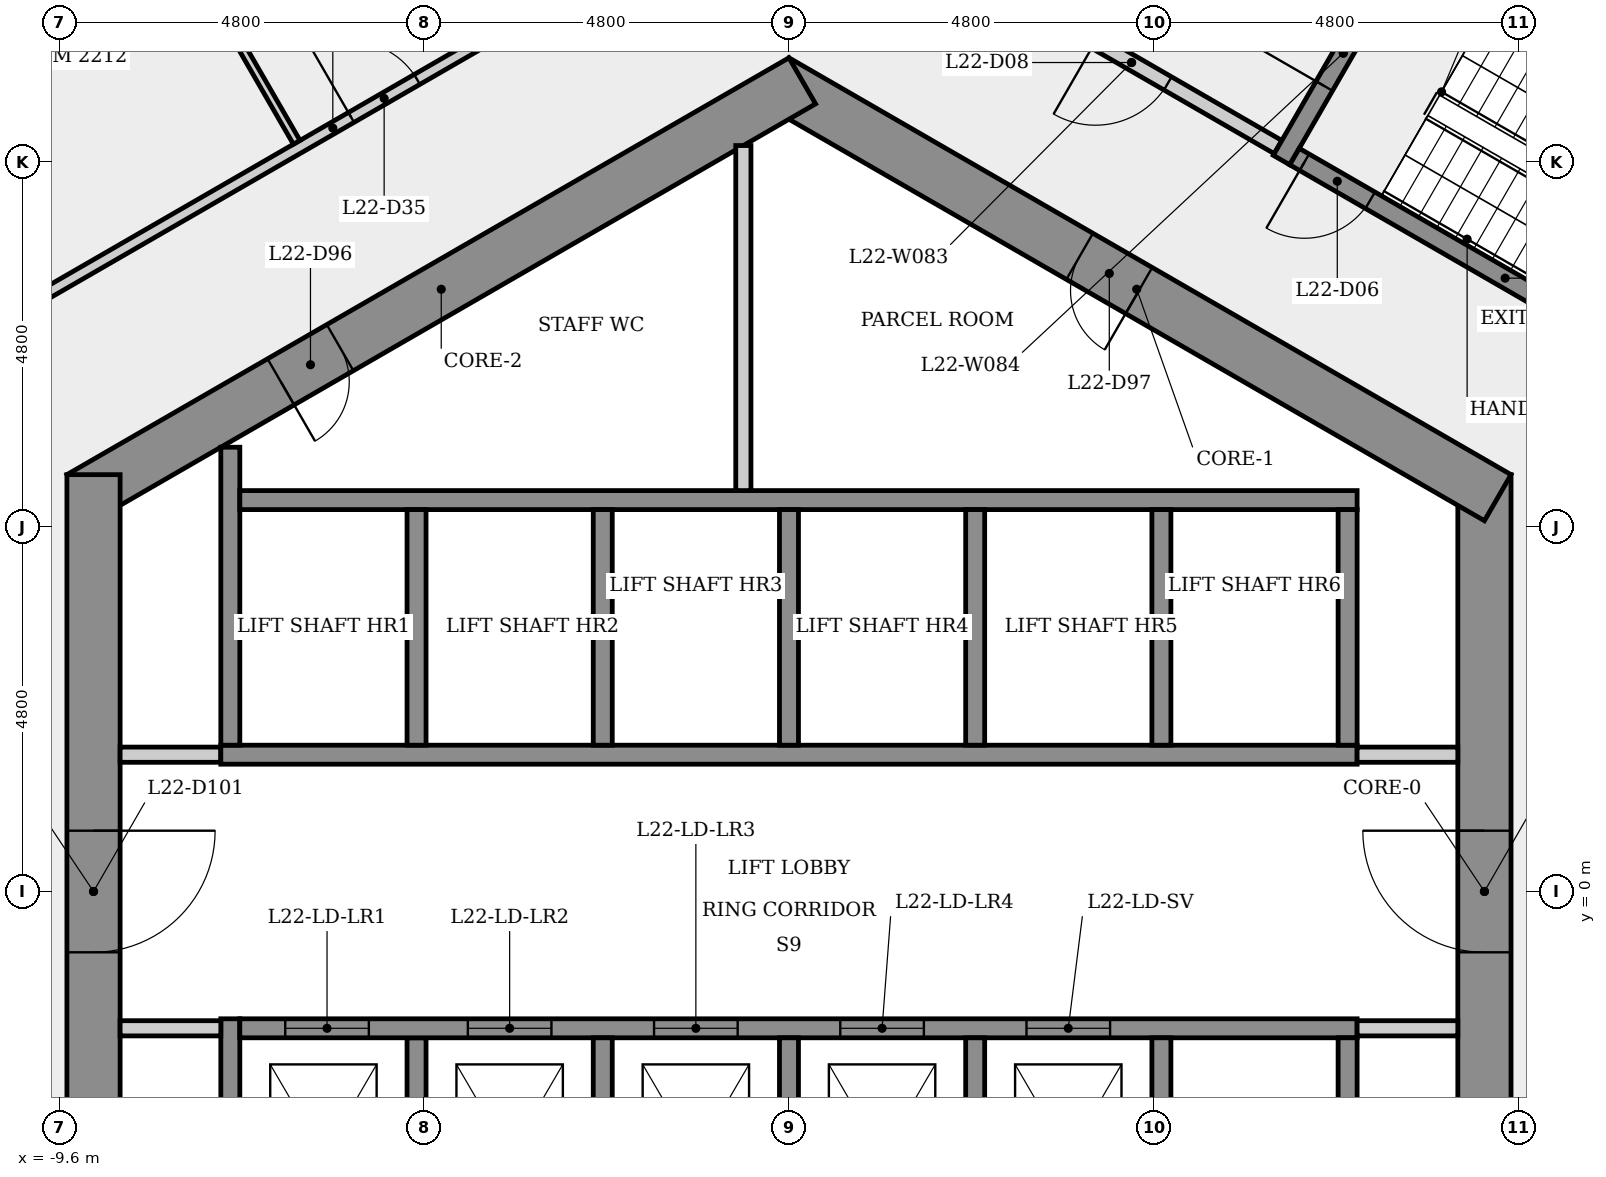
"""IFC4 building model, lengths in metres.
Left out: names, types, materials, properties, quantities, classifications, styles, units other than length and angle.
Written with IfcOpenShell. Run it as: python <this file> out.ifc"""

import sys

from ifc_helpers import new_model, si_unit, direction, frame, frame_2d, origin, place, context, subcontext, project, spatial, rectangle, extrude, element, fill, save


model = new_model("IFC4")
c1 = context("Model", 3, precision=1e-05, world=origin(), true_north=direction((0.0, 1.0)))
c2 = subcontext(c1, "Body", "Model", "MODEL_VIEW")
j1 = project(units=[si_unit("LENGTHUNIT", "METRE"), si_unit("PLANEANGLEUNIT", "RADIAN")], contexts=[c1])
p1 = place(None, origin())
s1 = spatial("IfcSite", under=j1, at=p1, CompositionType="ELEMENT")
p2 = place(p1, origin())
s2 = spatial("IfcBuilding", under=s1, at=p2, CompositionType="ELEMENT")
p3 = place(p2, frame((0.0, 0.0, 86.5)))
s3 = spatial("IfcBuildingStorey", under=s2, at=p3, CompositionType="ELEMENT", Elevation=86.5)
p4 = place(p3, frame((9.15, -5.485, 0.0), z_axis=(0.0, 0.0, 1.0), x_axis=(0.0, 1.0, 0.0)))
e1 = element("IfcWall", 1, at=p4, inside=s3, PredefinedType="SHEAR", context=c2, shape_type="SweptSolid", body=[
    extrude(rectangle(XDim=10.97, YDim=0.7, at=frame_2d((5.485, 0.0))), origin(), (0.0, 0.0, 1.0), 3.4),
])
p5 = place(p4, frame((4.685, 0.0, 0.0)))
e2 = element("IfcOpeningElement", 2, at=p5, cuts=e1, PredefinedType="OPENING", context=c2, shape_type="SweptSolid", body=[
    extrude(rectangle(XDim=1.6, YDim=2.1, at=frame_2d((0.8, 1.05))), frame((0.0, 0.36, 0.0), z_axis=(0.0, -1.0, 0.0), x_axis=(1.0, 0.0, 0.0)), (0.0, 0.0, 1.0), 0.72),
])
p6 = place(p3, frame((9.325, 5.182, 0.0), z_axis=(0.0, 0.0, 1.0), x_axis=(-0.866023993627, 0.500002442456, 0.0)))
e3 = element("IfcWall", 3, at=p6, inside=s3, PredefinedType="SHEAR", context=c2, shape_type="SweptSolid", body=[
    extrude(rectangle(XDim=10.97, YDim=0.7, at=frame_2d((5.485, 0.0))), origin(), (0.0, 0.0, 1.0), 3.4),
])
p7 = place(p6, frame((5.451, 0.0, 0.0)))
e4 = element("IfcOpeningElement", 4, at=p7, cuts=e3, PredefinedType="OPENING", context=c2, shape_type="SweptSolid", body=[
    extrude(rectangle(XDim=0.9, YDim=2.1, at=frame_2d((0.45, 1.05))), frame((0.0, 0.36, 0.0), z_axis=(0.0, -1.0, 0.0), x_axis=(1.0, 0.0, 0.0)), (0.0, 0.0, 1.0), 0.72),
])
p8 = place(p3, frame((0.175, 10.667, 0.0), z_axis=(0.0, 0.0, 1.0), x_axis=(-0.866023993627, -0.500002442456, 0.0)))
e5 = element("IfcWall", 5, at=p8, inside=s3, PredefinedType="SHEAR", context=c2, shape_type="SweptSolid", body=[
    extrude(rectangle(XDim=10.97, YDim=0.7, at=frame_2d((5.485, 0.0))), origin(), (0.0, 0.0, 1.0), 3.4),
])
p9 = place(p8, frame((7.021, 0.0, 0.0)))
e6 = element("IfcOpeningElement", 6, at=p9, cuts=e5, PredefinedType="OPENING", context=c2, shape_type="SweptSolid", body=[
    extrude(rectangle(XDim=0.9, YDim=2.1, at=frame_2d((0.45, 1.05))), frame((0.0, 0.36, 0.0), z_axis=(0.0, -1.0, 0.0), x_axis=(1.0, 0.0, 0.0)), (0.0, 0.0, 1.0), 0.72),
])
p10 = place(p3, frame((-9.15, 5.485, 0.0), z_axis=(0.0, 0.0, 1.0), x_axis=(0.0, -1.0, 0.0)))
e7 = element("IfcWall", 7, at=p10, inside=s3, PredefinedType="SHEAR", context=c2, shape_type="SweptSolid", body=[
    extrude(rectangle(XDim=10.97, YDim=0.7, at=frame_2d((5.485, 0.0))), origin(), (0.0, 0.0, 1.0), 3.4),
])
p11 = place(p10, frame((4.685, 0.0, 0.0)))
e8 = element("IfcOpeningElement", 8, at=p11, cuts=e7, PredefinedType="OPENING", context=c2, shape_type="SweptSolid", body=[
    extrude(rectangle(XDim=1.6, YDim=2.1, at=frame_2d((0.8, 1.05))), frame((0.0, 0.36, 0.0), z_axis=(0.0, -1.0, 0.0), x_axis=(1.0, 0.0, 0.0)), (0.0, 0.0, 1.0), 0.72),
])
p12 = place(p3, frame((-10.695, 7.335, 0.0), z_axis=(0.0, 0.0, 1.0), x_axis=(0.866020922188, 0.500007762273, 0.0)))
e9 = element("IfcWall", 9, at=p12, inside=s3, PredefinedType="PARTITIONING", context=c2, shape_type="SweptSolid", body=[
    extrude(rectangle(XDim=10.839, YDim=0.15, at=frame_2d((5.419, 0.0))), origin(), (0.0, 0.0, 1.0), 3.05),
])
p13 = place(p12, frame((5.699, 0.0, 0.0)))
e10 = element("IfcOpeningElement", 10, at=p13, cuts=e9, PredefinedType="OPENING", context=c2, shape_type="SweptSolid", body=[
    extrude(rectangle(XDim=1.0, YDim=2.1, at=frame_2d((0.5, 1.05))), frame((0.0, 0.085, 0.0), z_axis=(0.0, -1.0, 0.0), x_axis=(1.0, 0.0, 0.0)), (0.0, 0.0, 1.0), 0.17),
])
p14 = place(p3, frame((-8.8, 1.8, 0.0), z_axis=(0.0, 0.0, 1.0), x_axis=(1.0, 0.0, 0.0)))
e11 = element("IfcWall", 11, at=p14, inside=s3, PredefinedType="PARTITIONING", context=c2, shape_type="SweptSolid", body=[
    extrude(rectangle(XDim=1.325, YDim=0.2, at=frame_2d((0.663, 0.0))), origin(), (0.0, 0.0, 1.0), 3.05),
])
p15 = place(p3, frame((-7.475, 1.8, 0.0), z_axis=(0.0, 0.0, 1.0), x_axis=(1.0, 0.0, 0.0)))
e12 = element("IfcWall", 12, at=p15, inside=s3, PredefinedType="SHEAR", context=c2, shape_type="SweptSolid", body=[
    extrude(rectangle(XDim=14.95, YDim=0.25, at=frame_2d((7.475, 0.0))), origin(), (0.0, 0.0, 1.0), 3.05),
])
p16 = place(p3, frame((-7.35, -5.846, 0.0), z_axis=(0.0, 0.0, 1.0), x_axis=(0.0, 1.0, 0.0)))
e13 = element("IfcWall", 13, at=p16, inside=s3, PredefinedType="SHEAR", context=c2, shape_type="SweptSolid", body=[
    extrude(rectangle(XDim=4.171, YDim=0.25, at=frame_2d((2.085, 0.0))), origin(), (0.0, 0.0, 1.0), 3.05),
])
p17 = place(p3, frame((-7.35, 1.925, 0.0), z_axis=(0.0, 0.0, 1.0), x_axis=(0.0, 1.0, 0.0)))
e14 = element("IfcWall", 14, at=p17, inside=s3, PredefinedType="SHEAR", context=c2, shape_type="SweptSolid", body=[
    extrude(rectangle(XDim=3.921, YDim=0.25, at=frame_2d((1.96, 0.0))), origin(), (0.0, 0.0, 1.0), 3.05),
])
p18 = place(p3, frame((-7.225, 5.15, 0.0), z_axis=(0.0, 0.0, 1.0), x_axis=(1.0, 0.0, 0.0)))
e15 = element("IfcWall", 15, at=p18, inside=s3, PredefinedType="SHEAR", context=c2, shape_type="SweptSolid", body=[
    extrude(rectangle(XDim=14.7, YDim=0.25, at=frame_2d((7.35, 0.0))), origin(), (0.0, 0.0, 1.0), 3.05),
])
p19 = place(p3, frame((-7.475, -1.8, 0.0), z_axis=(0.0, 0.0, 1.0), x_axis=(-1.0, 0.0, 0.0)))
e16 = element("IfcWall", 16, at=p19, inside=s3, PredefinedType="PARTITIONING", context=c2, shape_type="SweptSolid", body=[
    extrude(rectangle(XDim=1.325, YDim=0.2, at=frame_2d((0.663, 0.0))), origin(), (0.0, 0.0, 1.0), 3.05),
])
p20 = place(p3, frame((-6.477, 9.857, 0.0), z_axis=(0.0, 0.0, 1.0), x_axis=(-0.499998876424, 0.86602605248, 0.0)))
e17 = element("IfcWall", 17, at=p20, inside=s3, PredefinedType="PARTITIONING", context=c2, shape_type="SweptSolid", body=[
    extrude(rectangle(XDim=8.231, YDim=0.1, at=frame_2d((4.116, 0.0))), origin(), (0.0, 0.0, 1.0), 3.05),
])
for number, where, z_axis, x_axis in (
    (18, (-4.9, -1.925, 0.0), (0.0, 0.0, 1.0), (0.0, -1.0, 0.0)),
    (19, (-4.9, 5.025, 0.0), (0.0, 0.0, 1.0), (0.0, -1.0, 0.0)),
):
    element("IfcWall", number, at=place(p3, frame(where, z_axis=z_axis, x_axis=x_axis)), inside=s3, PredefinedType="SHEAR", context=c2, shape_type="SweptSolid", body=[
        extrude(rectangle(XDim=3.1, YDim=0.25, at=frame_2d((1.55, 0.0))), origin(), (0.0, 0.0, 1.0), 3.4),
    ])
p21 = place(p3, frame((-7.225, -1.8, 0.0), z_axis=(0.0, 0.0, 1.0), x_axis=(1.0, 0.0, 0.0)))
e20 = element("IfcWall", 20, at=p21, inside=s3, PredefinedType="SHEAR", context=c2, shape_type="SweptSolid", body=[
    extrude(rectangle(XDim=14.7, YDim=0.25, at=frame_2d((7.35, 0.0))), origin(), (0.0, 0.0, 1.0), 3.05),
])
p22 = place(p21, frame((0.597, 0.0, 0.0)))
e21 = element("IfcOpeningElement", 21, at=p22, cuts=e20, PredefinedType="OPENING", context=c2, shape_type="SweptSolid", body=[
    extrude(rectangle(XDim=1.1, YDim=2.1, at=frame_2d((0.55, 1.05))), frame((0.0, 0.135, 0.0), z_axis=(0.0, -1.0, 0.0), x_axis=(1.0, 0.0, 0.0)), (0.0, 0.0, 1.0), 0.27),
])
p23 = place(p21, frame((3.0, 0.0, 0.0)))
e22 = element("IfcOpeningElement", 22, at=p23, cuts=e20, PredefinedType="OPENING", context=c2, shape_type="SweptSolid", body=[
    extrude(rectangle(XDim=1.1, YDim=2.1, at=frame_2d((0.55, 1.05))), frame((0.0, 0.135, 0.0), z_axis=(0.0, -1.0, 0.0), x_axis=(1.0, 0.0, 0.0)), (0.0, 0.0, 1.0), 0.27),
])
p24 = place(p21, frame((5.45, 0.0, 0.0)))
e23 = element("IfcOpeningElement", 23, at=p24, cuts=e20, PredefinedType="OPENING", context=c2, shape_type="SweptSolid", body=[
    extrude(rectangle(XDim=1.1, YDim=2.1, at=frame_2d((0.55, 1.05))), frame((0.0, 0.135, 0.0), z_axis=(0.0, -1.0, 0.0), x_axis=(1.0, 0.0, 0.0)), (0.0, 0.0, 1.0), 0.27),
])
p25 = place(p21, frame((7.9, 0.0, 0.0)))
e24 = element("IfcOpeningElement", 24, at=p25, cuts=e20, PredefinedType="OPENING", context=c2, shape_type="SweptSolid", body=[
    extrude(rectangle(XDim=1.1, YDim=2.1, at=frame_2d((0.55, 1.05))), frame((0.0, 0.135, 0.0), z_axis=(0.0, -1.0, 0.0), x_axis=(1.0, 0.0, 0.0)), (0.0, 0.0, 1.0), 0.27),
])
p26 = place(p21, frame((10.35, 0.0, 0.0)))
e25 = element("IfcOpeningElement", 25, at=p26, cuts=e20, PredefinedType="OPENING", context=c2, shape_type="SweptSolid", body=[
    extrude(rectangle(XDim=1.1, YDim=2.1, at=frame_2d((0.55, 1.05))), frame((0.0, 0.135, 0.0), z_axis=(0.0, -1.0, 0.0), x_axis=(1.0, 0.0, 0.0)), (0.0, 0.0, 1.0), 0.27),
])
for number, where, z_axis, x_axis in (
    (26, (-2.45, -1.925, 0.0), (0.0, 0.0, 1.0), (0.0, -1.0, 0.0)),
    (27, (-2.45, 5.025, 0.0), (0.0, 0.0, 1.0), (0.0, -1.0, 0.0)),
):
    element("IfcWall", number, at=place(p3, frame(where, z_axis=z_axis, x_axis=x_axis)), inside=s3, PredefinedType="SHEAR", context=c2, shape_type="SweptSolid", body=[
        extrude(rectangle(XDim=3.1, YDim=0.25, at=frame_2d((1.55, 0.0))), origin(), (0.0, 0.0, 1.0), 3.4),
    ])
p27 = place(p3, frame((-0.6, 9.815, 0.0), z_axis=(0.0, 0.0, 1.0), x_axis=(0.0, -1.0, 0.0)))
e28 = element("IfcWall", 28, at=p27, inside=s3, PredefinedType="PARTITIONING", context=c2, shape_type="SweptSolid", body=[
    extrude(rectangle(XDim=4.54, YDim=0.2, at=frame_2d((2.27, 0.0))), origin(), (0.0, 0.0, 1.0), 3.05),
])
for number, where, z_axis, x_axis in (
    (29, (0.0, -1.925, 0.0), (0.0, 0.0, 1.0), (0.0, -1.0, 0.0)),
    (30, (0.0, 5.025, 0.0), (0.0, 0.0, 1.0), (0.0, -1.0, 0.0)),
    (31, (2.45, -1.925, 0.0), (0.0, 0.0, 1.0), (0.0, -1.0, 0.0)),
    (32, (2.45, 5.025, 0.0), (0.0, 0.0, 1.0), (0.0, -1.0, 0.0)),
    (33, (4.9, -1.925, 0.0), (0.0, 0.0, 1.0), (0.0, -1.0, 0.0)),
    (34, (4.9, 5.025, 0.0), (0.0, 0.0, 1.0), (0.0, -1.0, 0.0)),
):
    element("IfcWall", number, at=place(p3, frame(where, z_axis=z_axis, x_axis=x_axis)), inside=s3, PredefinedType="SHEAR", context=c2, shape_type="SweptSolid", body=[
        extrude(rectangle(XDim=3.1, YDim=0.25, at=frame_2d((1.55, 0.0))), origin(), (0.0, 0.0, 1.0), 3.4),
    ])
p28 = place(p3, frame((6.435, 9.795, 0.0), z_axis=(0.0, 0.0, 1.0), x_axis=(-0.866012907634, 0.500021643343, 0.0)))
e35 = element("IfcWall", 35, at=p28, inside=s3, PredefinedType="PARTITIONING", context=c2, shape_type="SweptSolid", body=[
    extrude(rectangle(XDim=4.45, YDim=0.2, at=frame_2d((2.225, 0.0))), origin(), (0.0, 0.0, 1.0), 3.05),
])
p29 = place(p28, frame((1.675, 0.0, 0.0)))
e36 = element("IfcOpeningElement", 36, at=p29, cuts=e35, PredefinedType="OPENING", context=c2, shape_type="SweptSolid", body=[
    extrude(rectangle(XDim=1.1, YDim=2.1, at=frame_2d((0.55, 1.05))), frame((0.0, 0.11, 0.0), z_axis=(0.0, -1.0, 0.0), x_axis=(1.0, 0.0, 0.0)), (0.0, 0.0, 1.0), 0.22),
])
p30 = place(p3, frame((6.48, 9.624, 0.0), z_axis=(0.0, 0.0, 1.0), x_axis=(0.500017246033, 0.866015446554, 0.0)))
e37 = element("IfcWall", 37, at=p30, inside=s3, PredefinedType="SHEAR", context=c2, shape_type="SweptSolid", body=[
    extrude(rectangle(XDim=3.25, YDim=0.25, at=frame_2d((1.625, 0.0))), origin(), (0.0, 0.0, 1.0), 3.05),
])
p31 = place(p30, frame((1.125, 0.0, 0.0)))
e38 = element("IfcOpeningElement", 38, at=p31, cuts=e37, PredefinedType="OPENING", context=c2, shape_type="SweptSolid", body=[
    extrude(rectangle(XDim=1.0, YDim=2.1, at=frame_2d((0.5, 1.05))), frame((0.0, 0.135, 0.0), z_axis=(0.0, -1.0, 0.0), x_axis=(1.0, 0.0, 0.0)), (0.0, 0.0, 1.0), 0.27),
])
p32 = place(p3, frame((7.475, 1.8, 0.0), z_axis=(0.0, 0.0, 1.0), x_axis=(1.0, 0.0, 0.0)))
e39 = element("IfcWall", 39, at=p32, inside=s3, PredefinedType="PARTITIONING", context=c2, shape_type="SweptSolid", body=[
    extrude(rectangle(XDim=1.325, YDim=0.2, at=frame_2d((0.663, 0.0))), origin(), (0.0, 0.0, 1.0), 3.05),
])
for number, where, z_axis, x_axis in (
    (40, (7.35, -1.925, 0.0), (0.0, 0.0, 1.0), (0.0, -1.0, 0.0)),
    (41, (7.35, 5.025, 0.0), (0.0, 0.0, 1.0), (0.0, -1.0, 0.0)),
):
    element("IfcWall", number, at=place(p3, frame(where, z_axis=z_axis, x_axis=x_axis)), inside=s3, PredefinedType="SHEAR", context=c2, shape_type="SweptSolid", body=[
        extrude(rectangle(XDim=3.1, YDim=0.25, at=frame_2d((1.55, 0.0))), origin(), (0.0, 0.0, 1.0), 3.4),
    ])
p33 = place(p3, frame((8.151, 12.268, 0.0), z_axis=(0.0, 0.0, 1.0), x_axis=(0.866025499775, -0.499999833739, 0.0)))
e42 = element("IfcWall", 42, at=p33, inside=s3, PredefinedType="SHEAR", context=c2, shape_type="SweptSolid", body=[
    extrude(rectangle(XDim=6.4, YDim=0.25, at=frame_2d((3.2, 0.0))), origin(), (0.0, 0.0, 1.0), 3.05),
])
p34 = place(p3, frame((8.8, -1.8, 0.0), z_axis=(0.0, 0.0, 1.0), x_axis=(-1.0, 0.0, 0.0)))
e43 = element("IfcWall", 43, at=p34, inside=s3, PredefinedType="PARTITIONING", context=c2, shape_type="SweptSolid", body=[
    extrude(rectangle(XDim=1.325, YDim=0.2, at=frame_2d((0.663, 0.0))), origin(), (0.0, 0.0, 1.0), 3.05),
])
p35 = place(p3, frame((12.194, 6.47, 0.0), z_axis=(0.0, 0.0, 1.0), x_axis=(-0.866025499775, 0.499999833739, 0.0)))
e44 = element("IfcWall", 44, at=p35, inside=s3, PredefinedType="SHEAR", context=c2, shape_type="SweptSolid", body=[
    extrude(rectangle(XDim=6.4, YDim=0.25, at=frame_2d((3.2, 0.0))), origin(), (0.0, 0.0, 1.0), 3.05),
])
p36 = place(p35, frame((5.25, 0.0, 0.0)))
e45 = element("IfcOpeningElement", 45, at=p36, cuts=e44, PredefinedType="OPENING", context=c2, shape_type="SweptSolid", body=[
    extrude(rectangle(XDim=1.0, YDim=2.1, at=frame_2d((0.5, 1.05))), frame((0.0, 0.135, 0.0), z_axis=(0.0, -1.0, 0.0), x_axis=(1.0, 0.0, 0.0)), (0.0, 0.0, 1.0), 0.27),
])
p37 = place(p22, origin())
e46 = element("IfcDoor", 46, at=p37, inside=s3, OperationType="SLIDING_TO_LEFT", PredefinedType="DOOR", context=c2, shape_type="SweptSolid", body=[
    extrude(rectangle(XDim=1.1, YDim=2.1, at=frame_2d((0.55, 1.05))), frame((0.0, 0.025, 0.0), z_axis=(0.0, -1.0, 0.0), x_axis=(1.0, 0.0, 0.0)), (0.0, 0.0, 1.0), 0.05),
])
fill(e21, e46)
p38 = place(p23, origin())
e47 = element("IfcDoor", 47, at=p38, inside=s3, OperationType="SLIDING_TO_LEFT", PredefinedType="DOOR", context=c2, shape_type="SweptSolid", body=[
    extrude(rectangle(XDim=1.1, YDim=2.1, at=frame_2d((0.55, 1.05))), frame((0.0, 0.025, 0.0), z_axis=(0.0, -1.0, 0.0), x_axis=(1.0, 0.0, 0.0)), (0.0, 0.0, 1.0), 0.05),
])
fill(e22, e47)
p39 = place(p24, origin())
e48 = element("IfcDoor", 48, at=p39, inside=s3, OperationType="SLIDING_TO_LEFT", PredefinedType="DOOR", context=c2, shape_type="SweptSolid", body=[
    extrude(rectangle(XDim=1.1, YDim=2.1, at=frame_2d((0.55, 1.05))), frame((0.0, 0.025, 0.0), z_axis=(0.0, -1.0, 0.0), x_axis=(1.0, 0.0, 0.0)), (0.0, 0.0, 1.0), 0.05),
])
fill(e23, e48)
p40 = place(p25, origin())
e49 = element("IfcDoor", 49, at=p40, inside=s3, OperationType="SLIDING_TO_LEFT", PredefinedType="DOOR", context=c2, shape_type="SweptSolid", body=[
    extrude(rectangle(XDim=1.1, YDim=2.1, at=frame_2d((0.55, 1.05))), frame((0.0, 0.025, 0.0), z_axis=(0.0, -1.0, 0.0), x_axis=(1.0, 0.0, 0.0)), (0.0, 0.0, 1.0), 0.05),
])
fill(e24, e49)
p41 = place(p26, origin())
e50 = element("IfcDoor", 50, at=p41, inside=s3, OperationType="SLIDING_TO_LEFT", PredefinedType="DOOR", context=c2, shape_type="SweptSolid", body=[
    extrude(rectangle(XDim=1.1, YDim=2.1, at=frame_2d((0.55, 1.05))), frame((0.0, 0.025, 0.0), z_axis=(0.0, -1.0, 0.0), x_axis=(1.0, 0.0, 0.0)), (0.0, 0.0, 1.0), 0.05),
])
fill(e25, e50)
p42 = place(p36, origin())
e51 = element("IfcDoor", 51, at=p42, inside=s3, OperationType="SINGLE_SWING_RIGHT", PredefinedType="DOOR", context=c2, shape_type="SweptSolid", body=[
    extrude(rectangle(XDim=1.0, YDim=2.1, at=frame_2d((0.5, 1.05))), frame((0.0, 0.025, 0.0), z_axis=(0.0, -1.0, 0.0), x_axis=(1.0, 0.0, 0.0)), (0.0, 0.0, 1.0), 0.05),
])
fill(e45, e51)
p43 = place(p31, origin())
e52 = element("IfcDoor", 52, at=p43, inside=s3, OperationType="SINGLE_SWING_LEFT", PredefinedType="DOOR", context=c2, shape_type="SweptSolid", body=[
    extrude(rectangle(XDim=1.0, YDim=2.1, at=frame_2d((0.5, 1.05))), frame((0.0, 0.025, 0.0), z_axis=(0.0, -1.0, 0.0), x_axis=(1.0, 0.0, 0.0)), (0.0, 0.0, 1.0), 0.05),
])
fill(e38, e52)
p44 = place(p29, origin())
e53 = element("IfcDoor", 53, at=p44, inside=s3, OperationType="SINGLE_SWING_RIGHT", PredefinedType="DOOR", context=c2, shape_type="SweptSolid", body=[
    extrude(rectangle(XDim=1.1, YDim=2.1, at=frame_2d((0.55, 1.05))), frame((0.0, 0.025, 0.0), z_axis=(0.0, -1.0, 0.0), x_axis=(1.0, 0.0, 0.0)), (0.0, 0.0, 1.0), 0.05),
])
fill(e36, e53)
p45 = place(p13, origin())
e54 = element("IfcDoor", 54, at=p45, inside=s3, OperationType="SINGLE_SWING_LEFT", PredefinedType="DOOR", context=c2, shape_type="SweptSolid", body=[
    extrude(rectangle(XDim=1.0, YDim=2.1, at=frame_2d((0.5, 1.05))), frame((0.0, 0.025, 0.0), z_axis=(0.0, -1.0, 0.0), x_axis=(1.0, 0.0, 0.0)), (0.0, 0.0, 1.0), 0.05),
])
fill(e10, e54)
p46 = place(p9, origin())
e55 = element("IfcDoor", 55, at=p46, inside=s3, OperationType="SINGLE_SWING_RIGHT", PredefinedType="DOOR", context=c2, shape_type="SweptSolid", body=[
    extrude(rectangle(XDim=0.9, YDim=2.1, at=frame_2d((0.45, 1.05))), frame((0.0, 0.025, 0.0), z_axis=(0.0, -1.0, 0.0), x_axis=(1.0, 0.0, 0.0)), (0.0, 0.0, 1.0), 0.05),
])
fill(e6, e55)
p47 = place(p7, origin())
e56 = element("IfcDoor", 56, at=p47, inside=s3, OperationType="SINGLE_SWING_LEFT", PredefinedType="DOOR", context=c2, shape_type="SweptSolid", body=[
    extrude(rectangle(XDim=0.9, YDim=2.1, at=frame_2d((0.45, 1.05))), frame((0.0, 0.025, 0.0), z_axis=(0.0, -1.0, 0.0), x_axis=(1.0, 0.0, 0.0)), (0.0, 0.0, 1.0), 0.05),
])
fill(e4, e56)
p48 = place(p5, origin())
e57 = element("IfcDoor", 57, at=p48, inside=s3, OperationType="SINGLE_SWING_RIGHT", PredefinedType="DOOR", context=c2, shape_type="SweptSolid", body=[
    extrude(rectangle(XDim=1.6, YDim=2.1, at=frame_2d((0.8, 1.05))), frame((0.0, 0.025, 0.0), z_axis=(0.0, -1.0, 0.0), x_axis=(1.0, 0.0, 0.0)), (0.0, 0.0, 1.0), 0.05),
])
fill(e2, e57)
p49 = place(p11, origin())
e58 = element("IfcDoor", 58, at=p49, inside=s3, OperationType="SINGLE_SWING_LEFT", PredefinedType="DOOR", context=c2, shape_type="SweptSolid", body=[
    extrude(rectangle(XDim=1.6, YDim=2.1, at=frame_2d((0.8, 1.05))), frame((0.0, 0.025, 0.0), z_axis=(0.0, -1.0, 0.0), x_axis=(1.0, 0.0, 0.0)), (0.0, 0.0, 1.0), 0.05),
])
fill(e8, e58)
save(model, sys.argv[1])
